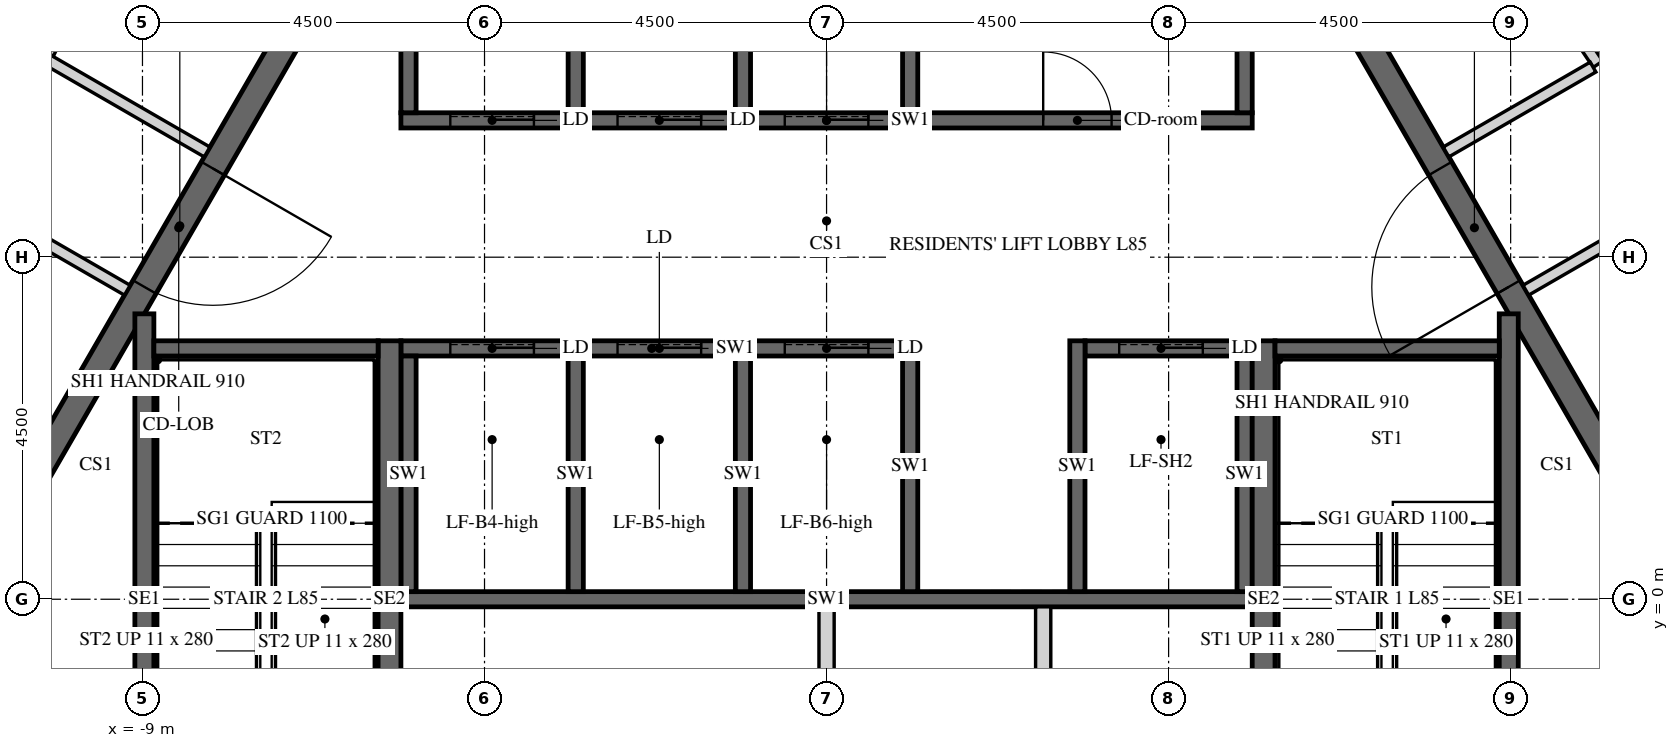
"""IFC4 building model, lengths in metres.
Left out: names, types, materials, properties, quantities, classifications, styles, units other than length and angle.
Written with IfcOpenShell. Run it as: python <this file> out.ifc"""

import sys

from ifc_helpers import new_model, si_unit, direction, frame, frame_2d, origin, place, context, subcontext, project, spatial, polyline, rectangle, outline, extrude, element, fill, save


model = new_model("IFC4")
c1 = context("Model", 3, precision=1e-05, world=origin(), true_north=direction((0.0, 1.0)))
c2 = subcontext(c1, "Body", "Model", "MODEL_VIEW")
j1 = project(units=[si_unit("LENGTHUNIT", "METRE"), si_unit("PLANEANGLEUNIT", "RADIAN")], contexts=[c1])
p1 = place(None, origin())
s1 = spatial("IfcSite", under=j1, at=p1, CompositionType="ELEMENT")
p2 = place(p1, origin())
s2 = spatial("IfcBuilding", under=s1, at=p2, CompositionType="ELEMENT")
p3 = place(p2, frame((0.0, 0.0, 353.4)))
s3 = spatial("IfcBuildingStorey", under=s2, at=p3, CompositionType="ELEMENT", Elevation=353.4)
p4 = place(p3, frame((-5.673, 9.825, -0.15), z_axis=(0.0, 0.0, 1.0), x_axis=(-0.499995046907, -0.866028263435, 0.0)))
e1 = element("IfcWall", 1, at=p4, inside=s3, PredefinedType="SHEAR", context=c2, shape_type="SweptSolid", body=[
    extrude(outline(polyline([(-0.101, -0.175), (11.446, -0.175), (11.244, 0.175), (0.101, 0.175), (-0.101, -0.175)])), origin(), (0.0, 0.0, 1.0), 3.9),
])
p5 = place(p4, frame((4.801, 0.0, 0.15)))
e2 = element("IfcOpeningElement", 2, at=p5, cuts=e1, PredefinedType="OPENING", context=c2, shape_type="SweptSolid", body=[
    extrude(rectangle(XDim=1.8, YDim=2.4, at=frame_2d((0.9, 1.2))), frame((0.0, 0.185, 0.0), z_axis=(0.0, -1.0, 0.0), x_axis=(1.0, 0.0, 0.0)), (0.0, 0.0, 1.0), 0.37),
])
p6 = place(p3, frame((-11.345, 0.0, -0.15), z_axis=(0.0, 0.0, 1.0), x_axis=(0.499995046907, -0.866028263435, 0.0)))
e3 = element("IfcWall", 3, at=p6, inside=s3, PredefinedType="SHEAR", context=c2, shape_type="SweptSolid", body=[
    extrude(outline(polyline([(-0.101, -0.175), (11.446, -0.175), (11.244, 0.175), (0.101, 0.175), (-0.101, -0.175)])), origin(), (0.0, 0.0, 1.0), 3.9),
])
p7 = place(p6, frame((4.744, 0.0, 0.15)))
e4 = element("IfcOpeningElement", 4, at=p7, cuts=e3, PredefinedType="OPENING", context=c2, shape_type="SweptSolid", body=[
    extrude(rectangle(XDim=1.8, YDim=2.4, at=frame_2d((0.9, 1.2))), frame((0.0, 0.185, 0.0), z_axis=(0.0, -1.0, 0.0), x_axis=(1.0, 0.0, 0.0)), (0.0, 0.0, 1.0), 0.37),
])
p8 = place(p3, frame((5.673, -9.825, -0.15), z_axis=(0.0, 0.0, 1.0), x_axis=(0.499995046907, 0.866028263435, 0.0)))
e5 = element("IfcWall", 5, at=p8, inside=s3, PredefinedType="SHEAR", context=c2, shape_type="SweptSolid", body=[
    extrude(outline(polyline([(-0.101, -0.175), (11.446, -0.175), (11.244, 0.175), (0.101, 0.175), (-0.101, -0.175)])), origin(), (0.0, 0.0, 1.0), 3.9),
])
p9 = place(p8, frame((4.801, 0.0, 0.15)))
e6 = element("IfcOpeningElement", 6, at=p9, cuts=e5, PredefinedType="OPENING", context=c2, shape_type="SweptSolid", body=[
    extrude(rectangle(XDim=1.8, YDim=2.4, at=frame_2d((0.9, 1.2))), frame((0.0, 0.185, 0.0), z_axis=(0.0, -1.0, 0.0), x_axis=(1.0, 0.0, 0.0)), (0.0, 0.0, 1.0), 0.37),
])
p10 = place(p3, frame((11.345, 0.0, -0.15), z_axis=(0.0, 0.0, 1.0), x_axis=(-0.499995046907, 0.866028263435, 0.0)))
e7 = element("IfcWall", 7, at=p10, inside=s3, PredefinedType="SHEAR", context=c2, shape_type="SweptSolid", body=[
    extrude(outline(polyline([(-0.101, -0.175), (11.446, -0.175), (11.244, 0.175), (0.101, 0.175), (-0.101, -0.175)])), origin(), (0.0, 0.0, 1.0), 3.9),
])
p11 = place(p10, frame((4.744, 0.0, 0.15)))
e8 = element("IfcOpeningElement", 8, at=p11, cuts=e7, PredefinedType="OPENING", context=c2, shape_type="SweptSolid", body=[
    extrude(rectangle(XDim=1.8, YDim=2.4, at=frame_2d((0.9, 1.2))), frame((0.0, 0.185, 0.0), z_axis=(0.0, -1.0, 0.0), x_axis=(1.0, 0.0, 0.0)), (0.0, 0.0, 1.0), 0.37),
])
p12 = place(p3, frame((-5.6, 6.3, -0.25), z_axis=(0.0, 0.0, 1.0), x_axis=(1.0, 0.0, 0.0)))
e9 = element("IfcWall", 9, at=p12, inside=s3, PredefinedType="SHEAR", context=c2, shape_type="SweptSolid", body=[
    extrude(rectangle(XDim=11.2, YDim=0.2, at=frame_2d((5.6, 0.0))), origin(), (0.0, 0.0, 1.0), 3.9),
])
p13 = place(p12, frame((8.45, 0.0, 0.25)))
e10 = element("IfcOpeningElement", 10, at=p13, cuts=e9, PredefinedType="OPENING", context=c2, shape_type="SweptSolid", body=[
    extrude(rectangle(XDim=0.9, YDim=2.1, at=frame_2d((0.45, 1.05))), frame((0.0, 0.11, 0.0), z_axis=(0.0, -1.0, 0.0), x_axis=(1.0, 0.0, 0.0)), (0.0, 0.0, 1.0), 0.22),
])
p14 = place(p12, frame((0.65, 0.0, 0.25)))
e11 = element("IfcOpeningElement", 11, at=p14, cuts=e9, PredefinedType="OPENING", context=c2, shape_type="SweptSolid", body=[
    extrude(rectangle(XDim=1.1, YDim=2.1, at=frame_2d((0.55, 1.05))), frame((0.0, 0.11, 0.0), z_axis=(0.0, -1.0, 0.0), x_axis=(1.0, 0.0, 0.0)), (0.0, 0.0, 1.0), 0.22),
])
p15 = place(p12, frame((2.85, 0.0, 0.25)))
e12 = element("IfcOpeningElement", 12, at=p15, cuts=e9, PredefinedType="OPENING", context=c2, shape_type="SweptSolid", body=[
    extrude(rectangle(XDim=1.1, YDim=2.1, at=frame_2d((0.55, 1.05))), frame((0.0, 0.11, 0.0), z_axis=(0.0, -1.0, 0.0), x_axis=(1.0, 0.0, 0.0)), (0.0, 0.0, 1.0), 0.22),
])
p16 = place(p12, frame((5.05, 0.0, 0.25)))
e13 = element("IfcOpeningElement", 13, at=p16, cuts=e9, PredefinedType="OPENING", context=c2, shape_type="SweptSolid", body=[
    extrude(rectangle(XDim=1.1, YDim=2.1, at=frame_2d((0.55, 1.05))), frame((0.0, 0.11, 0.0), z_axis=(0.0, -1.0, 0.0), x_axis=(1.0, 0.0, 0.0)), (0.0, 0.0, 1.0), 0.22),
])
for number, where, z_axis, x_axis in (
    (14, (-5.5, 6.4, -0.25), (0.0, 0.0, 1.0), (0.0, 1.0, 0.0)),
    (15, (-3.3, 6.4, -0.25), (0.0, 0.0, 1.0), (0.0, 1.0, 0.0)),
    (16, (-1.1, 6.4, -0.25), (0.0, 0.0, 1.0), (0.0, 1.0, 0.0)),
    (17, (1.1, 6.4, -0.25), (0.0, 0.0, 1.0), (0.0, 1.0, 0.0)),
    (18, (5.5, 6.4, -0.25), (0.0, 0.0, 1.0), (0.0, 1.0, 0.0)),
):
    element("IfcWall", number, at=place(p3, frame(where, z_axis=z_axis, x_axis=x_axis)), inside=s3, PredefinedType="SHEAR", context=c2, shape_type="SweptSolid", body=[
        extrude(rectangle(XDim=2.9, YDim=0.2, at=frame_2d((1.45, 0.0))), origin(), (0.0, 0.0, 1.0), 3.9),
    ])
p17 = place(p3, frame((-5.6, 3.3, -0.25), z_axis=(0.0, 0.0, 1.0), x_axis=(1.0, 0.0, 0.0)))
e19 = element("IfcWall", 19, at=p17, inside=s3, PredefinedType="SHEAR", context=c2, shape_type="SweptSolid", body=[
    extrude(rectangle(XDim=6.6, YDim=0.2, at=frame_2d((3.3, 0.0))), origin(), (0.0, 0.0, 1.0), 3.9),
])
p18 = place(p17, frame((0.65, 0.0, 0.25)))
e20 = element("IfcOpeningElement", 20, at=p18, cuts=e19, PredefinedType="OPENING", context=c2, shape_type="SweptSolid", body=[
    extrude(rectangle(XDim=1.1, YDim=2.1, at=frame_2d((0.55, 1.05))), frame((0.0, 0.11, 0.0), z_axis=(0.0, -1.0, 0.0), x_axis=(1.0, 0.0, 0.0)), (0.0, 0.0, 1.0), 0.22),
])
p19 = place(p17, frame((2.85, 0.0, 0.25)))
e21 = element("IfcOpeningElement", 21, at=p19, cuts=e19, PredefinedType="OPENING", context=c2, shape_type="SweptSolid", body=[
    extrude(rectangle(XDim=1.1, YDim=2.1, at=frame_2d((0.55, 1.05))), frame((0.0, 0.11, 0.0), z_axis=(0.0, -1.0, 0.0), x_axis=(1.0, 0.0, 0.0)), (0.0, 0.0, 1.0), 0.22),
])
p20 = place(p17, frame((5.05, 0.0, 0.25)))
e22 = element("IfcOpeningElement", 22, at=p20, cuts=e19, PredefinedType="OPENING", context=c2, shape_type="SweptSolid", body=[
    extrude(rectangle(XDim=1.1, YDim=2.1, at=frame_2d((0.55, 1.05))), frame((0.0, 0.11, 0.0), z_axis=(0.0, -1.0, 0.0), x_axis=(1.0, 0.0, 0.0)), (0.0, 0.0, 1.0), 0.22),
])
p21 = place(p3, frame((3.4, 3.3, -0.25), z_axis=(0.0, 0.0, 1.0), x_axis=(1.0, 0.0, 0.0)))
e23 = element("IfcWall", 23, at=p21, inside=s3, PredefinedType="SHEAR", context=c2, shape_type="SweptSolid", body=[
    extrude(rectangle(XDim=2.2, YDim=0.2, at=frame_2d((1.1, 0.0))), origin(), (0.0, 0.0, 1.0), 3.9),
])
p22 = place(p21, frame((0.45, 0.0, 0.25)))
e24 = element("IfcOpeningElement", 24, at=p22, cuts=e23, PredefinedType="OPENING", context=c2, shape_type="SweptSolid", body=[
    extrude(rectangle(XDim=1.1, YDim=2.1, at=frame_2d((0.55, 1.05))), frame((0.0, 0.11, 0.0), z_axis=(0.0, -1.0, 0.0), x_axis=(1.0, 0.0, 0.0)), (0.0, 0.0, 1.0), 0.22),
])
p23 = place(p3, frame((-5.6, 0.0, -0.25), z_axis=(0.0, 0.0, 1.0), x_axis=(1.0, 0.0, 0.0)))
e25 = element("IfcWall", 25, at=p23, inside=s3, PredefinedType="SHEAR", context=c2, shape_type="SweptSolid", body=[
    extrude(rectangle(XDim=11.2, YDim=0.2, at=frame_2d((5.6, 0.0))), origin(), (0.0, 0.0, 1.0), 3.9),
])
for number, where, z_axis, x_axis in (
    (26, (-5.5, 0.1, -0.25), (0.0, 0.0, 1.0), (0.0, 1.0, 0.0)),
    (27, (-3.3, 0.1, -0.25), (0.0, 0.0, 1.0), (0.0, 1.0, 0.0)),
    (28, (-1.1, 0.1, -0.25), (0.0, 0.0, 1.0), (0.0, 1.0, 0.0)),
):
    element("IfcWall", number, at=place(p3, frame(where, z_axis=z_axis, x_axis=x_axis)), inside=s3, PredefinedType="SHEAR", context=c2, shape_type="SweptSolid", body=[
        extrude(rectangle(XDim=3.1, YDim=0.2, at=frame_2d((1.55, 0.0))), origin(), (0.0, 0.0, 1.0), 3.9),
    ])
for number, where, z_axis, x_axis in (
    (29, (1.1, 0.1, -0.25), (0.0, 0.0, 1.0), (0.0, 1.0, 0.0)),
    (30, (3.3, 0.1, -0.25), (0.0, 0.0, 1.0), (0.0, 1.0, 0.0)),
):
    element("IfcWall", number, at=place(p3, frame(where, z_axis=z_axis, x_axis=x_axis)), inside=s3, PredefinedType="SHEAR", context=c2, shape_type="SweptSolid", body=[
        extrude(rectangle(XDim=3.3, YDim=0.2, at=frame_2d((1.65, 0.0))), origin(), (0.0, 0.0, 1.0), 3.9),
    ])
p24 = place(p3, frame((5.5, 0.1, -0.25), z_axis=(0.0, 0.0, 1.0), x_axis=(0.0, 1.0, 0.0)))
e31 = element("IfcWall", 31, at=p24, inside=s3, PredefinedType="SHEAR", context=c2, shape_type="SweptSolid", body=[
    extrude(rectangle(XDim=3.1, YDim=0.2, at=frame_2d((1.55, 0.0))), origin(), (0.0, 0.0, 1.0), 3.9),
])
p25 = place(p3, frame((2.85, -3.2, 0.0), z_axis=(0.0, 0.0, 1.0), x_axis=(0.0, 1.0, 0.0)))
e32 = element("IfcWall", 32, at=p25, inside=s3, PredefinedType="PARTITIONING", context=c2, shape_type="SweptSolid", body=[
    extrude(rectangle(XDim=3.1, YDim=0.2, at=frame_2d((1.55, 0.0))), origin(), (0.0, 0.0, 1.0), 3.65),
])
p26 = place(p3, frame((0.0, -6.2, 0.0), z_axis=(0.0, 0.0, 1.0), x_axis=(0.0, 1.0, 0.0)))
e33 = element("IfcWall", 33, at=p26, inside=s3, PredefinedType="PARTITIONING", context=c2, shape_type="SweptSolid", body=[
    extrude(rectangle(XDim=6.1, YDim=0.2, at=frame_2d((3.05, 0.0))), origin(), (0.0, 0.0, 1.0), 3.65),
])
p27 = place(p3, frame((5.75, -3.4, -0.25), z_axis=(0.0, 0.0, 1.0), x_axis=(0.0, 1.0, 0.0)))
e34 = element("IfcWall", 34, at=p27, inside=s3, PredefinedType="SHEAR", context=c2, shape_type="SweptSolid", body=[
    extrude(rectangle(XDim=6.8, YDim=0.3, at=frame_2d((3.4, 0.0))), origin(), (0.0, 0.0, 1.0), 3.9),
])
p28 = place(p3, frame((8.975, -3.755, -0.25), z_axis=(0.0, 0.0, 1.0), x_axis=(0.0, 1.0, 0.0)))
e35 = element("IfcWall", 35, at=p28, inside=s3, PredefinedType="SHEAR", context=c2, shape_type="SweptSolid", body=[
    extrude(rectangle(XDim=7.51, YDim=0.25, at=frame_2d((3.755, 0.0))), origin(), (0.0, 0.0, 1.0), 3.9),
])
p29 = place(p3, frame((5.9, 3.3, -0.25), z_axis=(0.0, 0.0, 1.0), x_axis=(1.0, 0.0, 0.0)))
e36 = element("IfcWall", 36, at=p29, inside=s3, PredefinedType="SHEAR", context=c2, shape_type="SweptSolid", body=[
    extrude(rectangle(XDim=2.95, YDim=0.2, at=frame_2d((1.475, 0.0))), origin(), (0.0, 0.0, 1.0), 3.9),
])
p30 = place(p3, frame((-5.75, -3.4, -0.25), z_axis=(0.0, 0.0, 1.0), x_axis=(0.0, 1.0, 0.0)))
e37 = element("IfcWall", 37, at=p30, inside=s3, PredefinedType="SHEAR", context=c2, shape_type="SweptSolid", body=[
    extrude(rectangle(XDim=6.8, YDim=0.3, at=frame_2d((3.4, 0.0))), origin(), (0.0, 0.0, 1.0), 3.9),
])
p31 = place(p3, frame((-8.975, -3.755, -0.25), z_axis=(0.0, 0.0, 1.0), x_axis=(0.0, 1.0, 0.0)))
e38 = element("IfcWall", 38, at=p31, inside=s3, PredefinedType="SHEAR", context=c2, shape_type="SweptSolid", body=[
    extrude(rectangle(XDim=7.51, YDim=0.25, at=frame_2d((3.755, 0.0))), origin(), (0.0, 0.0, 1.0), 3.9),
])
p32 = place(p3, frame((-8.85, 3.3, -0.25), z_axis=(0.0, 0.0, 1.0), x_axis=(1.0, 0.0, 0.0)))
e39 = element("IfcWall", 39, at=p32, inside=s3, PredefinedType="SHEAR", context=c2, shape_type="SweptSolid", body=[
    extrude(rectangle(XDim=2.95, YDim=0.2, at=frame_2d((1.475, 0.0))), origin(), (0.0, 0.0, 1.0), 3.9),
])
p33 = place(p3, frame((-7.903, 16.075, 0.0), z_axis=(0.0, 0.0, 1.0), x_axis=(-0.438364761272, -0.898797160696, 0.0)))
e40 = element("IfcWall", 40, at=p33, inside=s3, PredefinedType="PARTITIONING", context=c2, shape_type="SweptSolid", body=[
    extrude(rectangle(XDim=15.688, YDim=0.15, at=frame_2d((7.844, 0.0))), origin(), (0.0, 0.0, 1.0), 2.82),
])
p34 = place(p33, frame((2.942, 0.0, 0.0)))
e41 = element("IfcOpeningElement", 41, at=p34, cuts=e40, PredefinedType="OPENING", context=c2, shape_type="SweptSolid", body=[
    extrude(rectangle(XDim=1.0, YDim=2.1, at=frame_2d((0.5, 1.05))), frame((0.0, 0.085, 0.0), z_axis=(0.0, -1.0, 0.0), x_axis=(1.0, 0.0, 0.0)), (0.0, 0.0, 1.0), 0.17),
])
p35 = place(p3, frame((-11.131, 5.18, 0.0), z_axis=(0.0, 0.0, 1.0), x_axis=(0.866037886895, -0.499978377995, 0.0)))
e42 = element("IfcWall", 42, at=p35, inside=s3, PredefinedType="PARTITIONING", context=c2, shape_type="SweptSolid", body=[
    extrude(rectangle(XDim=2.229, YDim=0.15, at=frame_2d((1.115, 0.0))), origin(), (0.0, 0.0, 1.0), 2.82),
])
p36 = place(p3, frame((-8.15, 5.884, 0.0), z_axis=(0.0, 0.0, 1.0), x_axis=(-0.866009790468, 0.500027042082, 0.0)))
e43 = element("IfcWall", 43, at=p36, inside=s3, PredefinedType="PARTITIONING", context=c2, shape_type="SweptSolid", body=[
    extrude(rectangle(XDim=2.451, YDim=0.15, at=frame_2d((1.226, 0.0))), origin(), (0.0, 0.0, 1.0), 2.82),
])
p37 = place(p3, frame((-10.24, 7.178, 0.0), z_axis=(0.0, 0.0, 1.0), x_axis=(0.438356120288, 0.898801375058, 0.0)))
e44 = element("IfcWall", 44, at=p37, inside=s3, PredefinedType="PARTITIONING", context=c2, shape_type="SweptSolid", body=[
    extrude(rectangle(XDim=7.98, YDim=0.15, at=frame_2d((3.99, 0.0))), origin(), (0.0, 0.0, 1.0), 2.82),
])
p38 = place(p3, frame((17.873, -1.193, 0.0), z_axis=(0.0, 0.0, 1.0), x_axis=(-0.559195650252, 0.829035719821, 0.0)))
e45 = element("IfcWall", 45, at=p38, inside=s3, PredefinedType="PARTITIONING", context=c2, shape_type="SweptSolid", body=[
    extrude(rectangle(XDim=15.688, YDim=0.15, at=frame_2d((7.844, 0.0))), origin(), (0.0, 0.0, 1.0), 2.82),
])
p39 = place(p38, frame((5.792, 0.0, 0.0)))
e46 = element("IfcOpeningElement", 46, at=p39, cuts=e45, PredefinedType="OPENING", context=c2, shape_type="SweptSolid", body=[
    extrude(rectangle(XDim=1.0, YDim=2.1, at=frame_2d((0.5, 1.05))), frame((0.0, 0.085, 0.0), z_axis=(0.0, -1.0, 0.0), x_axis=(1.0, 0.0, 0.0)), (0.0, 0.0, 1.0), 0.17),
])
p40 = place(p3, frame((9.2, 4.066, 0.0), z_axis=(0.0, 0.0, 1.0), x_axis=(0.866038240688, 0.499977765172, 0.0)))
e47 = element("IfcWall", 47, at=p40, inside=s3, PredefinedType="PARTITIONING", context=c2, shape_type="SweptSolid", body=[
    extrude(rectangle(XDim=2.456, YDim=0.15, at=frame_2d((1.228, 0.0))), origin(), (0.0, 0.0, 1.0), 2.82),
])
p41 = place(p3, frame((7.221, 11.38, 0.0), z_axis=(0.0, 0.0, 1.0), x_axis=(0.559200548931, -0.829032415576, 0.0)))
e48 = element("IfcWall", 48, at=p41, inside=s3, PredefinedType="PARTITIONING", context=c2, shape_type="SweptSolid", body=[
    extrude(rectangle(XDim=5.236, YDim=0.15, at=frame_2d((2.618, 0.0))), origin(), (0.0, 0.0, 1.0), 2.82),
])
p42 = place(p41, frame((2.168, 0.0, 0.0)))
e49 = element("IfcOpeningElement", 49, at=p42, cuts=e48, PredefinedType="OPENING", context=c2, shape_type="SweptSolid", body=[
    extrude(rectangle(XDim=0.9, YDim=2.1, at=frame_2d((0.45, 1.05))), frame((0.0, 0.085, 0.0), z_axis=(0.0, -1.0, 0.0), x_axis=(1.0, 0.0, 0.0)), (0.0, 0.0, 1.0), 0.17),
])
p43 = place(p3, frame((10.084, 7.001, 0.0), z_axis=(0.0, 0.0, 1.0), x_axis=(-0.865994457699, -0.500053596362, 0.0)))
e50 = element("IfcWall", 50, at=p43, inside=s3, PredefinedType="PARTITIONING", context=c2, shape_type="SweptSolid", body=[
    extrude(rectangle(XDim=2.234, YDim=0.15, at=frame_2d((1.117, 0.0))), origin(), (0.0, 0.0, 1.0), 2.82),
])
p44 = place(p5, origin())
e51 = element("IfcDoor", 51, at=p44, inside=s3, OperationType="DOUBLE_DOOR_SINGLE_SWING", PredefinedType="DOOR", context=c2, shape_type="SweptSolid", body=[
    extrude(rectangle(XDim=1.8, YDim=2.4, at=frame_2d((0.9, 1.2))), frame((0.0, 0.025, 0.0), z_axis=(0.0, -1.0, 0.0), x_axis=(1.0, 0.0, 0.0)), (0.0, 0.0, 1.0), 0.05),
])
fill(e2, e51)
p45 = place(p11, origin())
e52 = element("IfcDoor", 52, at=p45, inside=s3, OperationType="DOUBLE_DOOR_SINGLE_SWING", PredefinedType="DOOR", context=c2, shape_type="SweptSolid", body=[
    extrude(rectangle(XDim=1.8, YDim=2.4, at=frame_2d((0.9, 1.2))), frame((0.0, 0.025, 0.0), z_axis=(0.0, -1.0, 0.0), x_axis=(1.0, 0.0, 0.0)), (0.0, 0.0, 1.0), 0.05),
])
fill(e8, e52)
p46 = place(p13, origin())
e53 = element("IfcDoor", 53, at=p46, inside=s3, OperationType="SINGLE_SWING_LEFT", PredefinedType="DOOR", context=c2, shape_type="SweptSolid", body=[
    extrude(rectangle(XDim=0.9, YDim=2.1, at=frame_2d((0.45, 1.05))), frame((0.0, 0.025, 0.0), z_axis=(0.0, -1.0, 0.0), x_axis=(1.0, 0.0, 0.0)), (0.0, 0.0, 1.0), 0.05),
])
fill(e10, e53)
p47 = place(p14, origin())
e54 = element("IfcDoor", 54, at=p47, inside=s3, OperationType="SLIDING_TO_LEFT", PredefinedType="DOOR", context=c2, shape_type="SweptSolid", body=[
    extrude(rectangle(XDim=1.1, YDim=2.1, at=frame_2d((0.55, 1.05))), frame((0.0, 0.025, 0.0), z_axis=(0.0, -1.0, 0.0), x_axis=(1.0, 0.0, 0.0)), (0.0, 0.0, 1.0), 0.05),
])
fill(e11, e54)
p48 = place(p15, origin())
e55 = element("IfcDoor", 55, at=p48, inside=s3, OperationType="SLIDING_TO_LEFT", PredefinedType="DOOR", context=c2, shape_type="SweptSolid", body=[
    extrude(rectangle(XDim=1.1, YDim=2.1, at=frame_2d((0.55, 1.05))), frame((0.0, 0.025, 0.0), z_axis=(0.0, -1.0, 0.0), x_axis=(1.0, 0.0, 0.0)), (0.0, 0.0, 1.0), 0.05),
])
fill(e12, e55)
p49 = place(p16, origin())
e56 = element("IfcDoor", 56, at=p49, inside=s3, OperationType="SLIDING_TO_LEFT", PredefinedType="DOOR", context=c2, shape_type="SweptSolid", body=[
    extrude(rectangle(XDim=1.1, YDim=2.1, at=frame_2d((0.55, 1.05))), frame((0.0, 0.025, 0.0), z_axis=(0.0, -1.0, 0.0), x_axis=(1.0, 0.0, 0.0)), (0.0, 0.0, 1.0), 0.05),
])
fill(e13, e56)
p50 = place(p18, origin())
e57 = element("IfcDoor", 57, at=p50, inside=s3, OperationType="SLIDING_TO_LEFT", PredefinedType="DOOR", context=c2, shape_type="SweptSolid", body=[
    extrude(rectangle(XDim=1.1, YDim=2.1, at=frame_2d((0.55, 1.05))), frame((0.0, 0.025, 0.0), z_axis=(0.0, -1.0, 0.0), x_axis=(1.0, 0.0, 0.0)), (0.0, 0.0, 1.0), 0.05),
])
fill(e20, e57)
p51 = place(p19, origin())
e58 = element("IfcDoor", 58, at=p51, inside=s3, OperationType="SLIDING_TO_LEFT", PredefinedType="DOOR", context=c2, shape_type="SweptSolid", body=[
    extrude(rectangle(XDim=1.1, YDim=2.1, at=frame_2d((0.55, 1.05))), frame((0.0, 0.025, 0.0), z_axis=(0.0, -1.0, 0.0), x_axis=(1.0, 0.0, 0.0)), (0.0, 0.0, 1.0), 0.05),
])
fill(e21, e58)
p52 = place(p20, origin())
e59 = element("IfcDoor", 59, at=p52, inside=s3, OperationType="SLIDING_TO_LEFT", PredefinedType="DOOR", context=c2, shape_type="SweptSolid", body=[
    extrude(rectangle(XDim=1.1, YDim=2.1, at=frame_2d((0.55, 1.05))), frame((0.0, 0.025, 0.0), z_axis=(0.0, -1.0, 0.0), x_axis=(1.0, 0.0, 0.0)), (0.0, 0.0, 1.0), 0.05),
])
fill(e22, e59)
p53 = place(p22, origin())
e60 = element("IfcDoor", 60, at=p53, inside=s3, OperationType="SLIDING_TO_LEFT", PredefinedType="DOOR", context=c2, shape_type="SweptSolid", body=[
    extrude(rectangle(XDim=1.1, YDim=2.1, at=frame_2d((0.55, 1.05))), frame((0.0, 0.025, 0.0), z_axis=(0.0, -1.0, 0.0), x_axis=(1.0, 0.0, 0.0)), (0.0, 0.0, 1.0), 0.05),
])
fill(e24, e60)
save(model, sys.argv[1])
